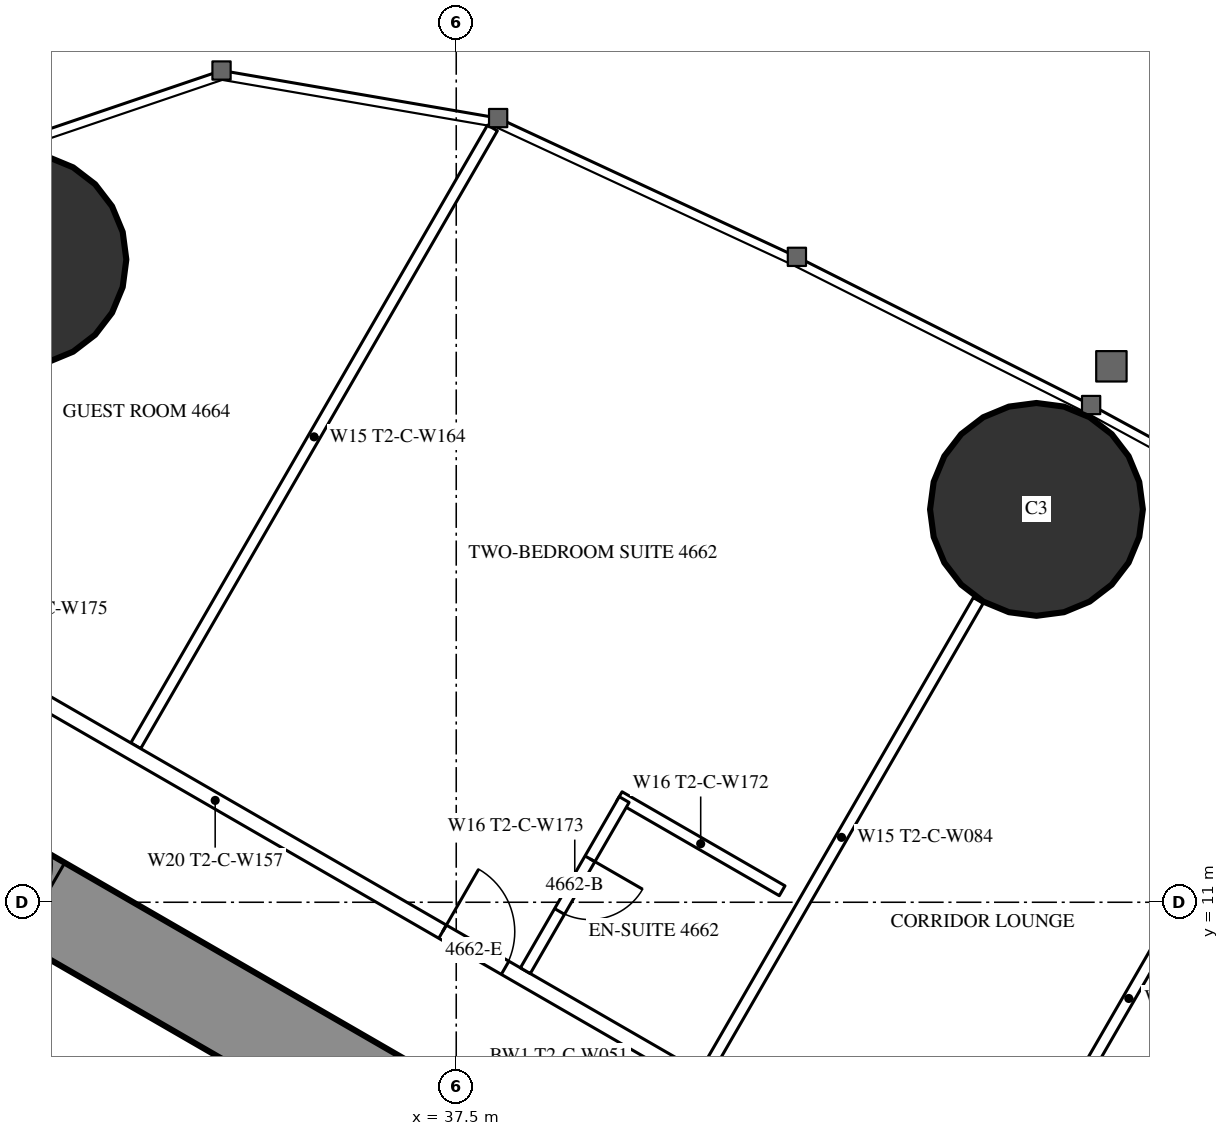
"""IFC4 building model, lengths in metres.
Left out: names, types, materials, properties, quantities, classifications, styles, units other than length and angle.
Written with IfcOpenShell. Run it as: python <this file> out.ifc"""

import sys

from ifc_helpers import new_model, si_unit, direction, frame, frame_2d, origin, origin_2d, place, context, subcontext, project, spatial, rectangle, circle, extrude, element, fill, save


model = new_model("IFC4")
c1 = context("Model", 3, precision=1e-05, world=origin(), true_north=direction((0.0, 1.0)))
c2 = subcontext(c1, "Body", "Model", "MODEL_VIEW")
j1 = project(units=[si_unit("LENGTHUNIT", "METRE"), si_unit("PLANEANGLEUNIT", "RADIAN")], contexts=[c1])
p1 = place(None, origin())
s1 = spatial("IfcSite", under=j1, at=p1, CompositionType="ELEMENT")
p2 = place(p1, origin())
s2 = spatial("IfcBuilding", under=s1, at=p2, CompositionType="ELEMENT")
p3 = place(p2, frame((0.0, 0.0, 173.8)))
s3 = spatial("IfcBuildingStorey", under=s2, at=p3, CompositionType="ELEMENT", Elevation=173.8)
for number, where, z_axis, x_axis in (
    (1, (31.76, 19.456, 0.0), (0.0, 0.0, 1.0), (1.0, 0.0, 0.0)),
    (2, (45.134, 16.168, 0.0), (0.0, 0.0, 1.0), (1.0, 0.0, 0.0)),
):
    element("IfcColumn", number, at=place(p3, frame(where, z_axis=z_axis, x_axis=x_axis)), inside=s3, PredefinedType="COLUMN", context=c2, shape_type="SweptSolid", body=[
        extrude(circle(Radius=1.4, at=origin_2d()), origin(), (0.0, 0.0, 1.0), 3.5),
    ])
p4 = place(p3, frame((27.2, 13.8, 0.0), z_axis=(0.0, 0.0, 1.0), x_axis=(0.866024515034, -0.500001539357, 0.0)))
e3 = element("IfcWall", 3, at=p4, inside=s3, PredefinedType="SHEAR", context=c2, shape_type="SweptSolid", body=[
    extrude(rectangle(XDim=26.907, YDim=1.2, at=frame_2d((13.454, 0.0))), origin(), (0.0, 0.0, 1.0), 3.5),
])
p5 = place(p4, frame((4.6, 0.0, 0.0)))
e4 = element("IfcOpeningElement", 4, at=p5, cuts=e3, PredefinedType="OPENING", context=c2, shape_type="SweptSolid", body=[
    extrude(rectangle(XDim=1.0, YDim=2.2, at=frame_2d((0.5, 1.1))), frame((0.0, 0.61, 0.0), z_axis=(0.0, -1.0, 0.0), x_axis=(1.0, 0.0, 0.0)), (0.0, 0.0, 1.0), 1.22),
])
p6 = place(p4, frame((13.395, 0.0, 0.0)))
e5 = element("IfcOpeningElement", 5, at=p6, cuts=e3, PredefinedType="OPENING", context=c2, shape_type="SweptSolid", body=[
    extrude(rectangle(XDim=1.8, YDim=2.2, at=frame_2d((0.9, 1.1))), frame((0.0, 0.61, 0.0), z_axis=(0.0, -1.0, 0.0), x_axis=(1.0, 0.0, 0.0)), (0.0, 0.0, 1.0), 1.22),
])
p7 = place(p3, frame((33.284, 13.059, 0.0), z_axis=(0.0, 0.0, 1.0), x_axis=(0.499985904184, 0.866033541855, 0.0)))
e6 = element("IfcWall", 6, at=p7, inside=s3, PredefinedType="PARTITIONING", context=c2, shape_type="SweptSolid", body=[
    extrude(rectangle(XDim=9.385, YDim=0.15, at=frame_2d((4.693, 0.0))), origin(), (0.0, 0.0, 1.0), 3.25),
])
p8 = place(p3, frame((40.769, 8.737, 0.0), z_axis=(0.0, 0.0, 1.0), x_axis=(0.500013115284, 0.866017831539, 0.0)))
e7 = element("IfcWall", 7, at=p8, inside=s3, PredefinedType="PARTITIONING", context=c2, shape_type="SweptSolid", body=[
    extrude(rectangle(XDim=7.198, YDim=0.15, at=frame_2d((3.599, 0.0))), origin(), (0.0, 0.0, 1.0), 2.3),
])
p9 = place(p3, frame((44.521, 6.571, 0.0), z_axis=(0.0, 0.0, 1.0), x_axis=(0.500020376429, 0.866013639128, 0.0)))
e8 = element("IfcWall", 8, at=p9, inside=s3, PredefinedType="PARTITIONING", context=c2, shape_type="SweptSolid", body=[
    extrude(rectangle(XDim=7.306, YDim=0.15, at=frame_2d((3.653, 0.0))), origin(), (0.0, 0.0, 1.0), 2.3),
])
p10 = place(p3, frame((27.959, 16.017, 0.0), z_axis=(0.0, 0.0, 1.0), x_axis=(0.866024165033, -0.500002145574, 0.0)))
e9 = element("IfcWall", 9, at=p10, inside=s3, PredefinedType="PARTITIONING", context=c2, shape_type="SweptSolid", body=[
    extrude(rectangle(XDim=14.709, YDim=0.2, at=frame_2d((7.354, 0.0))), origin(), (0.0, 0.0, 1.0), 3.25),
])
p11 = place(p10, frame((10.809, 0.0, 0.0)))
e10 = element("IfcOpeningElement", 10, at=p11, cuts=e9, PredefinedType="OPENING", context=c2, shape_type="SweptSolid", body=[
    extrude(rectangle(XDim=0.95, YDim=2.2, at=frame_2d((0.475, 1.1))), frame((0.0, 0.11, 0.0), z_axis=(0.0, -1.0, 0.0), x_axis=(1.0, 0.0, 0.0)), (0.0, 0.0, 1.0), 0.22),
])
p12 = place(p10, frame((2.95, 0.0, 0.0)))
e11 = element("IfcOpeningElement", 11, at=p12, cuts=e9, PredefinedType="OPENING", context=c2, shape_type="SweptSolid", body=[
    extrude(rectangle(XDim=0.95, YDim=2.2, at=frame_2d((0.475, 1.1))), frame((0.0, 0.11, 0.0), z_axis=(0.0, -1.0, 0.0), x_axis=(1.0, 0.0, 0.0)), (0.0, 0.0, 1.0), 0.22),
])
p13 = place(p3, frame((39.645, 12.389, 0.0), z_axis=(0.0, 0.0, 1.0), x_axis=(0.866006523861, -0.500032699561, 0.0)))
e12 = element("IfcWall", 12, at=p13, inside=s3, PredefinedType="PARTITIONING", context=c2, shape_type="SweptSolid", body=[
    extrude(rectangle(XDim=2.475, YDim=0.15, at=frame_2d((1.237, 0.0))), origin(), (0.0, 0.0, 1.0), 3.25),
])
p14 = place(p3, frame((38.409, 10.099, 0.0), z_axis=(0.0, 0.0, 1.0), x_axis=(0.500006934395, 0.866021400173, 0.0)))
e13 = element("IfcWall", 13, at=p14, inside=s3, PredefinedType="PARTITIONING", context=c2, shape_type="SweptSolid", body=[
    extrude(rectangle(XDim=2.6, YDim=0.15, at=frame_2d((1.3, 0.0))), origin(), (0.0, 0.0, 1.0), 3.25),
])
p15 = place(p14, frame((0.9, 0.0, 0.0)))
e14 = element("IfcOpeningElement", 14, at=p15, cuts=e13, PredefinedType="OPENING", context=c2, shape_type="SweptSolid", body=[
    extrude(rectangle(XDim=0.8, YDim=2.2, at=frame_2d((0.4, 1.1))), frame((0.0, 0.085, 0.0), z_axis=(0.0, -1.0, 0.0), x_axis=(1.0, 0.0, 0.0)), (0.0, 0.0, 1.0), 0.17),
])
p16 = place(p15, origin())
e15 = element("IfcDoor", 15, at=p16, inside=s3, OperationType="SINGLE_SWING_RIGHT", PredefinedType="DOOR", context=c2, shape_type="SweptSolid", body=[
    extrude(rectangle(XDim=0.8, YDim=2.2, at=frame_2d((0.4, 1.1))), frame((0.0, 0.025, 0.0), z_axis=(0.0, -1.0, 0.0), x_axis=(1.0, 0.0, 0.0)), (0.0, 0.0, 1.0), 0.05),
])
fill(e14, e15)
p17 = place(p11, origin())
e16 = element("IfcDoor", 16, at=p17, inside=s3, OperationType="SINGLE_SWING_LEFT", PredefinedType="DOOR", context=c2, shape_type="SweptSolid", body=[
    extrude(rectangle(XDim=0.95, YDim=2.2, at=frame_2d((0.475, 1.1))), frame((0.0, 0.025, 0.0), z_axis=(0.0, -1.0, 0.0), x_axis=(1.0, 0.0, 0.0)), (0.0, 0.0, 1.0), 0.05),
])
fill(e10, e16)
save(model, sys.argv[1])
